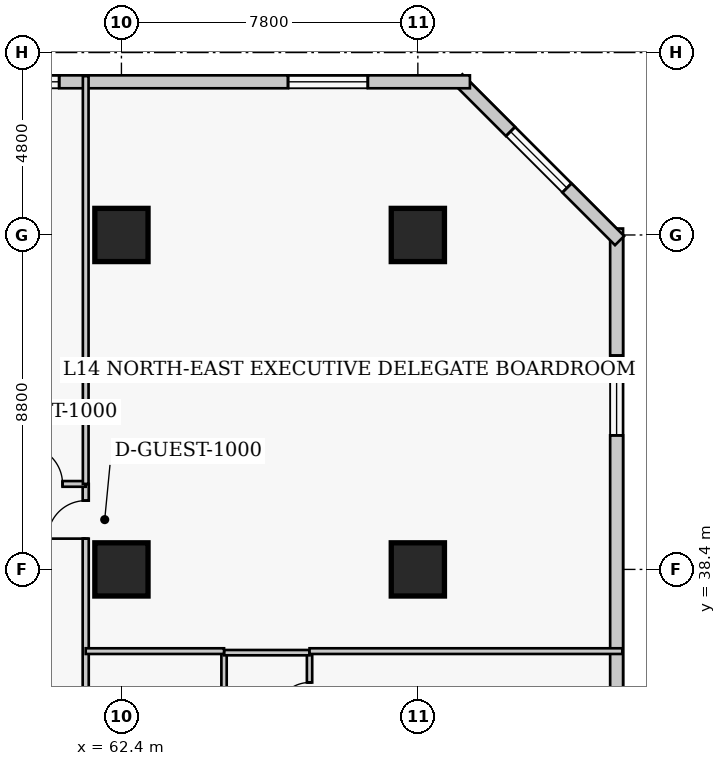
"""IFC4 building model, lengths in metres.
Left out: names, types, materials, properties, quantities, classifications, styles, units other than length and angle.
Written with IfcOpenShell. Run it as: python <this file> out.ifc"""

import sys

from ifc_helpers import new_model, si_unit, direction, frame, frame_2d, origin, origin_2d, place, context, subcontext, project, spatial, rectangle, extrude, element, fill, save


model = new_model("IFC4")
c1 = context("Model", 3, precision=1e-05, world=origin(), true_north=direction((0.0, 1.0)))
c2 = subcontext(c1, "Body", "Model", "MODEL_VIEW")
j1 = project(units=[si_unit("LENGTHUNIT", "METRE"), si_unit("PLANEANGLEUNIT", "RADIAN")], contexts=[c1])
p1 = place(None, origin())
s1 = spatial("IfcSite", under=j1, at=p1, CompositionType="ELEMENT")
p2 = place(p1, origin())
s2 = spatial("IfcBuilding", under=s1, at=p2, CompositionType="ELEMENT")
p3 = place(p2, frame((0.0, 0.0, 60.2)))
s3 = spatial("IfcBuildingStorey", under=s2, at=p3, CompositionType="ELEMENT", Elevation=60.2)
for number, where, z_axis, x_axis in (
    (1, (62.4, 38.4, 0.0), (0.0, 0.0, 1.0), (1.0, 0.0, 0.0)),
    (2, (62.4, 47.2, 0.0), (0.0, 0.0, 1.0), (1.0, 0.0, 0.0)),
    (3, (70.2, 38.4, 0.0), (0.0, 0.0, 1.0), (1.0, 0.0, 0.0)),
    (4, (70.2, 47.2, 0.0), (0.0, 0.0, 1.0), (1.0, 0.0, 0.0)),
):
    element("IfcColumn", number, at=place(p3, frame(where, z_axis=z_axis, x_axis=x_axis)), inside=s3, PredefinedType="COLUMN", context=c2, shape_type="SweptSolid", body=[
        extrude(rectangle(XDim=1.4, YDim=1.4, at=origin_2d()), origin(), (0.0, 0.0, 1.0), 3.8),
    ])
p4 = place(p3, frame((75.43, 12.23, 0.0), z_axis=(0.0, 0.0, 1.0), x_axis=(0.0, 1.0, 0.0)))
e5 = element("IfcWall", 5, at=p4, inside=s3, PredefinedType="SOLIDWALL", context=c2, shape_type="SweptSolid", body=[
    extrude(rectangle(XDim=35.14, YDim=0.34, at=frame_2d((17.57, 0.0))), origin(), (0.0, 0.0, 1.0), 3.54),
])
p5 = place(p4, frame((3.343, 0.0, 0.85)))
e6 = element("IfcOpeningElement", 6, at=p5, cuts=e5, PredefinedType="OPENING", context=c2, shape_type="SweptSolid", body=[
    extrude(rectangle(XDim=2.1, YDim=1.85, at=frame_2d((1.05, 0.925))), frame((0.0, 0.18, 0.0), z_axis=(0.0, -1.0, 0.0), x_axis=(1.0, 0.0, 0.0)), (0.0, 0.0, 1.0), 0.36),
])
p6 = place(p4, frame((12.127, 0.0, 0.85)))
e7 = element("IfcOpeningElement", 7, at=p6, cuts=e5, PredefinedType="OPENING", context=c2, shape_type="SweptSolid", body=[
    extrude(rectangle(XDim=2.1, YDim=1.85, at=frame_2d((1.05, 0.925))), frame((0.0, 0.18, 0.0), z_axis=(0.0, -1.0, 0.0), x_axis=(1.0, 0.0, 0.0)), (0.0, 0.0, 1.0), 0.36),
])
p7 = place(p4, frame((20.913, 0.0, 0.85)))
e8 = element("IfcOpeningElement", 8, at=p7, cuts=e5, PredefinedType="OPENING", context=c2, shape_type="SweptSolid", body=[
    extrude(rectangle(XDim=2.1, YDim=1.85, at=frame_2d((1.05, 0.925))), frame((0.0, 0.18, 0.0), z_axis=(0.0, -1.0, 0.0), x_axis=(1.0, 0.0, 0.0)), (0.0, 0.0, 1.0), 0.36),
])
p8 = place(p4, frame((29.698, 0.0, 0.85)))
e9 = element("IfcOpeningElement", 9, at=p8, cuts=e5, PredefinedType="OPENING", context=c2, shape_type="SweptSolid", body=[
    extrude(rectangle(XDim=2.1, YDim=1.85, at=frame_2d((1.05, 0.925))), frame((0.0, 0.18, 0.0), z_axis=(0.0, -1.0, 0.0), x_axis=(1.0, 0.0, 0.0)), (0.0, 0.0, 1.0), 0.36),
])
p9 = place(p3, frame((75.508, 47.052, 0.0), z_axis=(0.0, 0.0, 1.0), x_axis=(-0.707106781187, 0.707106781187, 0.0)))
e10 = element("IfcWall", 10, at=p9, inside=s3, PredefinedType="SOLIDWALL", context=c2, shape_type="SweptSolid", body=[
    extrude(rectangle(XDim=6.02, YDim=0.34, at=frame_2d((3.01, 0.0))), origin(), (0.0, 0.0, 1.0), 3.54),
])
p10 = place(p9, frame((1.96, 0.0, 0.85)))
e11 = element("IfcOpeningElement", 11, at=p10, cuts=e10, PredefinedType="OPENING", context=c2, shape_type="SweptSolid", body=[
    extrude(rectangle(XDim=2.1, YDim=1.85, at=frame_2d((1.05, 0.925))), frame((0.0, 0.18, 0.0), z_axis=(0.0, -1.0, 0.0), x_axis=(1.0, 0.0, 0.0)), (0.0, 0.0, 1.0), 0.36),
])
p11 = place(p3, frame((71.57, 51.23, 0.0), z_axis=(0.0, 0.0, 1.0), x_axis=(-1.0, 0.0, 0.0)))
e12 = element("IfcWall", 12, at=p11, inside=s3, PredefinedType="SOLIDWALL", context=c2, shape_type="SweptSolid", body=[
    extrude(rectangle(XDim=29.89, YDim=0.34, at=frame_2d((14.945, 0.0))), origin(), (0.0, 0.0, 1.0), 3.54),
])
p12 = place(p11, frame((2.686, 0.0, 0.85)))
e13 = element("IfcOpeningElement", 13, at=p12, cuts=e12, PredefinedType="OPENING", context=c2, shape_type="SweptSolid", body=[
    extrude(rectangle(XDim=2.1, YDim=1.85, at=frame_2d((1.05, 0.925))), frame((0.0, 0.18, 0.0), z_axis=(0.0, -1.0, 0.0), x_axis=(1.0, 0.0, 0.0)), (0.0, 0.0, 1.0), 0.36),
])
p13 = place(p11, frame((10.809, 0.0, 0.85)))
e14 = element("IfcOpeningElement", 14, at=p13, cuts=e12, PredefinedType="OPENING", context=c2, shape_type="SweptSolid", body=[
    extrude(rectangle(XDim=2.1, YDim=1.85, at=frame_2d((1.05, 0.925))), frame((0.0, 0.18, 0.0), z_axis=(0.0, -1.0, 0.0), x_axis=(1.0, 0.0, 0.0)), (0.0, 0.0, 1.0), 0.36),
])
p14 = place(p11, frame((17.631, 0.0, 0.85)))
e15 = element("IfcOpeningElement", 15, at=p14, cuts=e12, PredefinedType="OPENING", context=c2, shape_type="SweptSolid", body=[
    extrude(rectangle(XDim=2.1, YDim=1.85, at=frame_2d((1.05, 0.925))), frame((0.0, 0.18, 0.0), z_axis=(0.0, -1.0, 0.0), x_axis=(1.0, 0.0, 0.0)), (0.0, 0.0, 1.0), 0.36),
])
p15 = place(p11, frame((25.104, 0.0, 0.85)))
e16 = element("IfcOpeningElement", 16, at=p15, cuts=e12, PredefinedType="OPENING", context=c2, shape_type="SweptSolid", body=[
    extrude(rectangle(XDim=2.1, YDim=1.85, at=frame_2d((1.05, 0.925))), frame((0.0, 0.18, 0.0), z_axis=(0.0, -1.0, 0.0), x_axis=(1.0, 0.0, 0.0)), (0.0, 0.0, 1.0), 0.36),
])
p16 = place(p3, frame((61.46, 10.25, 0.0), z_axis=(0.0, 0.0, 1.0), x_axis=(0.0, 1.0, 0.0)))
e17 = element("IfcWall", 17, at=p16, inside=s3, PredefinedType="PARTITIONING", context=c2, shape_type="SweptSolid", body=[
    extrude(rectangle(XDim=30.4, YDim=0.16, at=frame_2d((15.2, 0.0))), origin(), (0.0, 0.0, 1.0), 3.54),
])
p17 = place(p16, frame((4.4, 0.0, 0.0)))
e18 = element("IfcOpeningElement", 18, at=p17, cuts=e17, PredefinedType="OPENING", context=c2, shape_type="SweptSolid", body=[
    extrude(rectangle(XDim=0.95, YDim=2.1, at=frame_2d((0.475, 1.05))), frame((0.0, 0.09, 0.0), z_axis=(0.0, -1.0, 0.0), x_axis=(1.0, 0.0, 0.0)), (0.0, 0.0, 1.0), 0.18),
])
p18 = place(p16, frame((13.337, 0.0, 0.0)))
e19 = element("IfcOpeningElement", 19, at=p18, cuts=e17, PredefinedType="OPENING", context=c2, shape_type="SweptSolid", body=[
    extrude(rectangle(XDim=0.95, YDim=2.1, at=frame_2d((0.475, 1.05))), frame((0.0, 0.09, 0.0), z_axis=(0.0, -1.0, 0.0), x_axis=(1.0, 0.0, 0.0)), (0.0, 0.0, 1.0), 0.18),
])
p19 = place(p16, frame((21.462, 0.0, 0.0)))
e20 = element("IfcOpeningElement", 20, at=p19, cuts=e17, PredefinedType="OPENING", context=c2, shape_type="SweptSolid", body=[
    extrude(rectangle(XDim=0.95, YDim=2.1, at=frame_2d((0.475, 1.05))), frame((0.0, 0.09, 0.0), z_axis=(0.0, -1.0, 0.0), x_axis=(1.0, 0.0, 0.0)), (0.0, 0.0, 1.0), 0.18),
])
p20 = place(p16, frame((28.96, 0.0, 0.0)))
e21 = element("IfcOpeningElement", 21, at=p20, cuts=e17, PredefinedType="OPENING", context=c2, shape_type="SweptSolid", body=[
    extrude(rectangle(XDim=1.0, YDim=2.15, at=frame_2d((0.5, 1.075))), frame((0.0, 0.09, 0.0), z_axis=(0.0, -1.0, 0.0), x_axis=(1.0, 0.0, 0.0)), (0.0, 0.0, 1.0), 0.18),
])
p21 = place(p3, frame((56.8, 40.65, 0.0), z_axis=(0.0, 0.0, 1.0), x_axis=(1.0, 0.0, 0.0)))
e22 = element("IfcWall", 22, at=p21, inside=s3, PredefinedType="PARTITIONING", context=c2, shape_type="SweptSolid", body=[
    extrude(rectangle(XDim=4.66, YDim=0.15, at=frame_2d((2.33, 0.0))), origin(), (0.0, 0.0, 1.0), 3.54),
])
p22 = place(p21, frame((3.05, 0.0, 0.0)))
e23 = element("IfcOpeningElement", 23, at=p22, cuts=e22, PredefinedType="OPENING", context=c2, shape_type="SweptSolid", body=[
    extrude(rectangle(XDim=1.0, YDim=2.15, at=frame_2d((0.5, 1.075))), frame((0.0, 0.085, 0.0), z_axis=(0.0, -1.0, 0.0), x_axis=(1.0, 0.0, 0.0)), (0.0, 0.0, 1.0), 0.17),
])
p23 = place(p3, frame((61.46, 40.65, 0.0), z_axis=(0.0, 0.0, 1.0), x_axis=(0.0, 1.0, 0.0)))
e24 = element("IfcWall", 24, at=p23, inside=s3, PredefinedType="PARTITIONING", context=c2, shape_type="SweptSolid", body=[
    extrude(rectangle(XDim=10.73, YDim=0.15, at=frame_2d((5.365, 0.0))), origin(), (0.0, 0.0, 1.0), 3.54),
])
p24 = place(p3, frame((65.1, 33.76, 0.0), z_axis=(0.0, 0.0, 1.0), x_axis=(0.0, 1.0, 0.0)))
e25 = element("IfcWall", 25, at=p24, inside=s3, PredefinedType="PLUMBINGWALL", context=c2, shape_type="SweptSolid", body=[
    extrude(rectangle(XDim=2.45, YDim=0.14, at=frame_2d((1.225, 0.0))), origin(), (0.0, 0.0, 1.0), 3.54),
])
p25 = place(p3, frame((67.35, 33.76, 0.0), z_axis=(0.0, 0.0, 1.0), x_axis=(0.0, 1.0, 0.0)))
e26 = element("IfcWall", 26, at=p25, inside=s3, PredefinedType="PLUMBINGWALL", context=c2, shape_type="SweptSolid", body=[
    extrude(rectangle(XDim=2.45, YDim=0.14, at=frame_2d((1.225, 0.0))), origin(), (0.0, 0.0, 1.0), 3.54),
])
p26 = place(p25, frame((0.785, 0.0, 0.0)))
e27 = element("IfcOpeningElement", 27, at=p26, cuts=e26, PredefinedType="OPENING", context=c2, shape_type="SweptSolid", body=[
    extrude(rectangle(XDim=0.88, YDim=2.05, at=frame_2d((0.44, 1.025))), frame((0.0, 0.08, 0.0), z_axis=(0.0, -1.0, 0.0), x_axis=(1.0, 0.0, 0.0)), (0.0, 0.0, 1.0), 0.16),
])
p27 = place(p3, frame((65.1, 36.21, 0.0), z_axis=(0.0, 0.0, 1.0), x_axis=(1.0, 0.0, 0.0)))
e28 = element("IfcWall", 28, at=p27, inside=s3, PredefinedType="PLUMBINGWALL", context=c2, shape_type="SweptSolid", body=[
    extrude(rectangle(XDim=2.25, YDim=0.14, at=frame_2d((1.125, 0.0))), origin(), (0.0, 0.0, 1.0), 3.54),
])
p28 = place(p3, frame((61.46, 36.25, 0.0), z_axis=(0.0, 0.0, 1.0), x_axis=(1.0, 0.0, 0.0)))
e29 = element("IfcWall", 29, at=p28, inside=s3, PredefinedType="PARTITIONING", context=c2, shape_type="SweptSolid", body=[
    extrude(rectangle(XDim=3.64, YDim=0.15, at=frame_2d((1.82, 0.0))), origin(), (0.0, 0.0, 1.0), 3.54),
])
p29 = place(p3, frame((67.35, 36.25, 0.0), z_axis=(0.0, 0.0, 1.0), x_axis=(1.0, 0.0, 0.0)))
e30 = element("IfcWall", 30, at=p29, inside=s3, PredefinedType="PARTITIONING", context=c2, shape_type="SweptSolid", body=[
    extrude(rectangle(XDim=8.23, YDim=0.15, at=frame_2d((4.115, 0.0))), origin(), (0.0, 0.0, 1.0), 3.54),
])
p30 = place(p8, origin())
e31 = element("IfcWindow", 31, at=p30, inside=s3, PartitioningType="SINGLE_PANEL", PredefinedType="WINDOW", context=c2, shape_type="SweptSolid", body=[
    extrude(rectangle(XDim=2.1, YDim=1.85, at=frame_2d((1.05, 0.925))), frame((0.0, 0.03, 0.0), z_axis=(0.0, -1.0, 0.0), x_axis=(1.0, 0.0, 0.0)), (0.0, 0.0, 1.0), 0.06),
])
fill(e9, e31)
p31 = place(p10, origin())
e32 = element("IfcWindow", 32, at=p31, inside=s3, PartitioningType="SINGLE_PANEL", PredefinedType="WINDOW", context=c2, shape_type="SweptSolid", body=[
    extrude(rectangle(XDim=2.1, YDim=1.85, at=frame_2d((1.05, 0.925))), frame((0.0, 0.03, 0.0), z_axis=(0.0, -1.0, 0.0), x_axis=(1.0, 0.0, 0.0)), (0.0, 0.0, 1.0), 0.06),
])
fill(e11, e32)
p32 = place(p12, origin())
e33 = element("IfcWindow", 33, at=p32, inside=s3, PartitioningType="SINGLE_PANEL", PredefinedType="WINDOW", context=c2, shape_type="SweptSolid", body=[
    extrude(rectangle(XDim=2.1, YDim=1.85, at=frame_2d((1.05, 0.925))), frame((0.0, 0.03, 0.0), z_axis=(0.0, -1.0, 0.0), x_axis=(1.0, 0.0, 0.0)), (0.0, 0.0, 1.0), 0.06),
])
fill(e13, e33)
p33 = place(p13, origin())
e34 = element("IfcWindow", 34, at=p33, inside=s3, PartitioningType="SINGLE_PANEL", PredefinedType="WINDOW", context=c2, shape_type="SweptSolid", body=[
    extrude(rectangle(XDim=2.1, YDim=1.85, at=frame_2d((1.05, 0.925))), frame((0.0, 0.03, 0.0), z_axis=(0.0, -1.0, 0.0), x_axis=(1.0, 0.0, 0.0)), (0.0, 0.0, 1.0), 0.06),
])
fill(e14, e34)
p34 = place(p22, origin())
e35 = element("IfcDoor", 35, at=p34, inside=s3, OperationType="SINGLE_SWING_LEFT", PredefinedType="DOOR", context=c2, shape_type="SweptSolid", body=[
    extrude(rectangle(XDim=1.0, YDim=2.15, at=frame_2d((0.5, 1.075))), frame((0.0, 0.025, 0.0), z_axis=(0.0, -1.0, 0.0), x_axis=(1.0, 0.0, 0.0)), (0.0, 0.0, 1.0), 0.05),
])
fill(e23, e35)
p35 = place(p26, origin())
e36 = element("IfcDoor", 36, at=p35, inside=s3, OperationType="SINGLE_SWING_LEFT", PredefinedType="DOOR", context=c2, shape_type="SweptSolid", body=[
    extrude(rectangle(XDim=0.88, YDim=2.05, at=frame_2d((0.44, 1.025))), frame((0.0, 0.025, 0.0), z_axis=(0.0, -1.0, 0.0), x_axis=(1.0, 0.0, 0.0)), (0.0, 0.0, 1.0), 0.05),
])
fill(e27, e36)
p36 = place(p20, origin())
e37 = element("IfcDoor", 37, at=p36, inside=s3, OperationType="SINGLE_SWING_LEFT", PredefinedType="DOOR", context=c2, shape_type="SweptSolid", body=[
    extrude(rectangle(XDim=1.0, YDim=2.15, at=frame_2d((0.5, 1.075))), frame((0.0, 0.025, 0.0), z_axis=(0.0, -1.0, 0.0), x_axis=(1.0, 0.0, 0.0)), (0.0, 0.0, 1.0), 0.05),
])
fill(e21, e37)
save(model, sys.argv[1])
